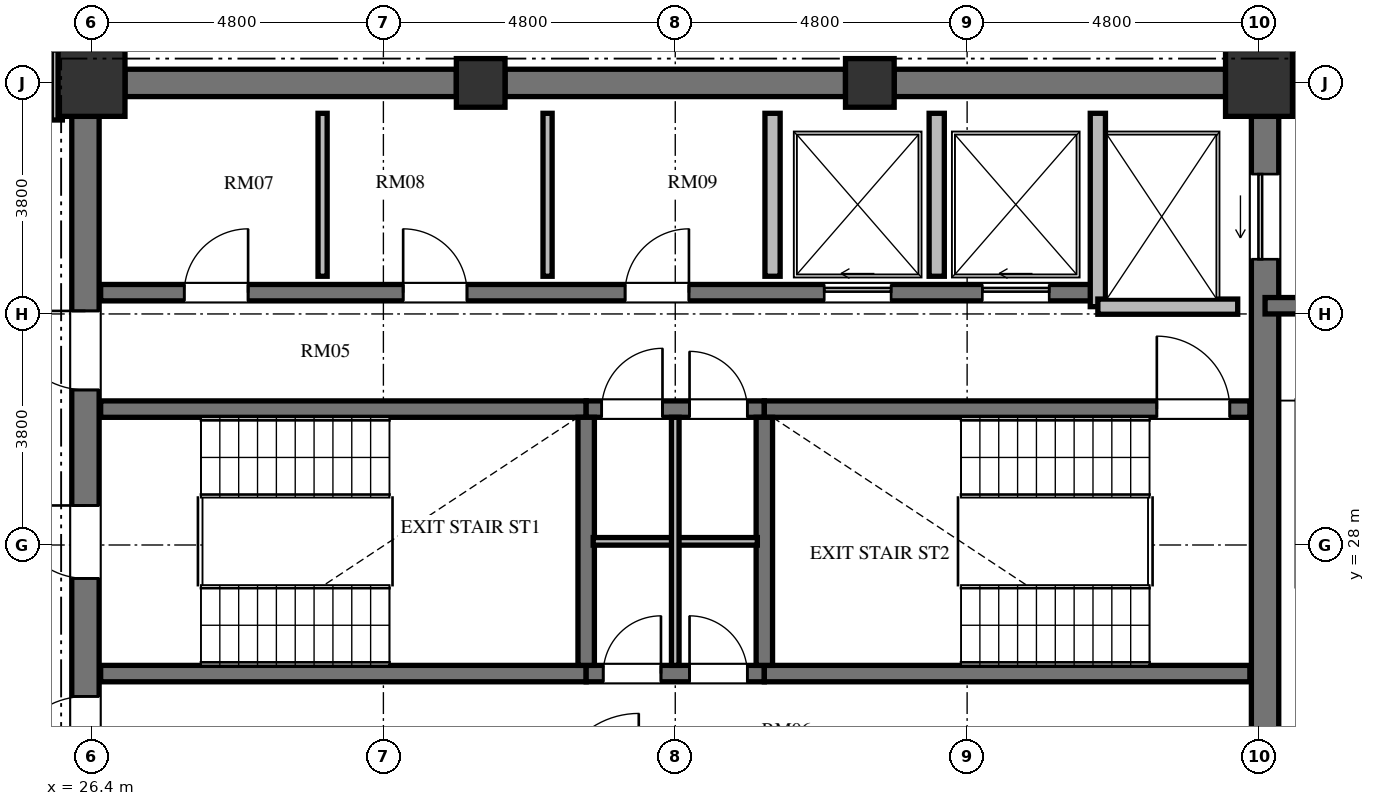
"""IFC4 building model, lengths in metres.
Left out: names, types, materials, properties, quantities, classifications, styles, units other than length and angle.
Written with IfcOpenShell. Run it as: python <this file> out.ifc"""

import sys

from ifc_helpers import new_model, si_unit, direction, frame, frame_2d, origin, origin_2d, place, context, subcontext, project, spatial, rectangle, extrude, element, fill, save


model = new_model("IFC4")
c1 = context("Model", 3, precision=1e-05, world=origin(), true_north=direction((0.0, 1.0)))
c2 = subcontext(c1, "Body", "Model", "MODEL_VIEW")
j1 = project(units=[si_unit("LENGTHUNIT", "METRE"), si_unit("PLANEANGLEUNIT", "RADIAN")], contexts=[c1])
p1 = place(None, origin())
s1 = spatial("IfcSite", under=j1, at=p1, CompositionType="ELEMENT")
p2 = place(p1, origin())
s2 = spatial("IfcBuilding", under=s1, at=p2, CompositionType="ELEMENT")
p3 = place(p2, frame((0.0, 0.0, 262.32)))
s3 = spatial("IfcBuildingStorey", under=s2, at=p3, CompositionType="ELEMENT", Elevation=262.32)
p4 = place(p3, frame((45.6, 35.6, 0.0), z_axis=(0.0, 0.0, 1.0), x_axis=(1.0, 0.0, 0.0)))
e1 = element("IfcColumn", 1, at=p4, inside=s3, PredefinedType="COLUMN", context=c2, shape_type="SweptSolid", body=[
    extrude(rectangle(XDim=1.1, YDim=1.1, at=origin_2d()), origin(), (0.0, 0.0, 1.0), 3.648),
])
for number, where, z_axis, x_axis in (
    (2, (39.2, 35.6, 0.0), (0.0, 0.0, 1.0), (1.0, 0.0, 0.0)),
    (3, (32.8, 35.6, 0.0), (0.0, 0.0, 1.0), (1.0, 0.0, 0.0)),
):
    element("IfcColumn", number, at=place(p3, frame(where, z_axis=z_axis, x_axis=x_axis)), inside=s3, PredefinedType="COLUMN", context=c2, shape_type="SweptSolid", body=[
        extrude(rectangle(XDim=0.8, YDim=0.8, at=origin_2d()), origin(), (0.0, 0.0, 1.0), 3.648),
    ])
p5 = place(p3, frame((26.4, 35.6, 0.0), z_axis=(0.0, 0.0, 1.0), x_axis=(1.0, 0.0, 0.0)))
e4 = element("IfcColumn", 4, at=p5, inside=s3, PredefinedType="COLUMN", context=c2, shape_type="SweptSolid", body=[
    extrude(rectangle(XDim=1.1, YDim=1.1, at=origin_2d()), origin(), (0.0, 0.0, 1.0), 3.648),
])
p6 = place(p3, frame((26.3, 20.95, 0.0), z_axis=(0.0, 0.0, 1.0), x_axis=(0.0, 1.0, 0.0)))
e5 = element("IfcWall", 5, at=p6, inside=s3, PredefinedType="SHEAR", context=c2, shape_type="SweptSolid", body=[
    extrude(rectangle(XDim=14.1, YDim=0.45, at=frame_2d((7.05, 0.0))), origin(), (0.0, 0.0, 1.0), 3.648),
])
p7 = place(p6, frame((6.5, 0.0, 0.0)))
e6 = element("IfcOpeningElement", 6, at=p7, cuts=e5, PredefinedType="OPENING", context=c2, shape_type="SweptSolid", body=[
    extrude(rectangle(XDim=1.2, YDim=2.15, at=frame_2d((0.6, 1.075))), frame((0.0, 0.235, 0.0), z_axis=(0.0, -1.0, 0.0), x_axis=(1.0, 0.0, 0.0)), (0.0, 0.0, 1.0), 0.47),
])
p8 = place(p6, frame((9.6, 0.0, 0.0)))
e7 = element("IfcOpeningElement", 7, at=p8, cuts=e5, PredefinedType="OPENING", context=c2, shape_type="SweptSolid", body=[
    extrude(rectangle(XDim=1.3, YDim=2.2, at=frame_2d((0.65, 1.1))), frame((0.0, 0.235, 0.0), z_axis=(0.0, -1.0, 0.0), x_axis=(1.0, 0.0, 0.0)), (0.0, 0.0, 1.0), 0.47),
])
p9 = place(p6, frame((3.26, 0.0, 0.0)))
e8 = element("IfcOpeningElement", 8, at=p9, cuts=e5, PredefinedType="OPENING", context=c2, shape_type="SweptSolid", body=[
    extrude(rectangle(XDim=1.3, YDim=2.2, at=frame_2d((0.65, 1.1))), frame((0.0, 0.235, 0.0), z_axis=(0.0, -1.0, 0.0), x_axis=(1.0, 0.0, 0.0)), (0.0, 0.0, 1.0), 0.47),
])
p10 = place(p3, frame((45.7, 20.95, 0.0), z_axis=(0.0, 0.0, 1.0), x_axis=(0.0, 1.0, 0.0)))
e9 = element("IfcWall", 9, at=p10, inside=s3, PredefinedType="SHEAR", context=c2, shape_type="SweptSolid", body=[
    extrude(rectangle(XDim=14.1, YDim=0.45, at=frame_2d((7.05, 0.0))), origin(), (0.0, 0.0, 1.0), 3.648),
])
p11 = place(p10, frame((11.75, 0.0, 0.0)))
e10 = element("IfcOpeningElement", 10, at=p11, cuts=e9, PredefinedType="OPENING", context=c2, shape_type="SweptSolid", body=[
    extrude(rectangle(XDim=1.4, YDim=2.3, at=frame_2d((0.7, 1.15))), frame((0.0, 0.235, 0.0), z_axis=(0.0, -1.0, 0.0), x_axis=(1.0, 0.0, 0.0)), (0.0, 0.0, 1.0), 0.47),
])
p12 = place(p10, frame((0.95, 0.0, 0.0)))
e11 = element("IfcOpeningElement", 11, at=p12, cuts=e9, PredefinedType="OPENING", context=c2, shape_type="SweptSolid", body=[
    extrude(rectangle(XDim=1.4, YDim=2.3, at=frame_2d((0.7, 1.15))), frame((0.0, 0.235, 0.0), z_axis=(0.0, -1.0, 0.0), x_axis=(1.0, 0.0, 0.0)), (0.0, 0.0, 1.0), 0.47),
])
p13 = place(p3, frame((26.95, 35.6, 0.0), z_axis=(0.0, 0.0, 1.0), x_axis=(1.0, 0.0, 0.0)))
e12 = element("IfcWall", 12, at=p13, inside=s3, PredefinedType="SHEAR", context=c2, shape_type="SweptSolid", body=[
    extrude(rectangle(XDim=5.45, YDim=0.45, at=frame_2d((2.725, 0.0))), origin(), (0.0, 0.0, 1.0), 3.648),
])
p14 = place(p3, frame((33.2, 35.6, 0.0), z_axis=(0.0, 0.0, 1.0), x_axis=(1.0, 0.0, 0.0)))
e13 = element("IfcWall", 13, at=p14, inside=s3, PredefinedType="SHEAR", context=c2, shape_type="SweptSolid", body=[
    extrude(rectangle(XDim=5.6, YDim=0.45, at=frame_2d((2.8, 0.0))), origin(), (0.0, 0.0, 1.0), 3.648),
])
p15 = place(p3, frame((39.6, 35.6, 0.0), z_axis=(0.0, 0.0, 1.0), x_axis=(1.0, 0.0, 0.0)))
e14 = element("IfcWall", 14, at=p15, inside=s3, PredefinedType="SHEAR", context=c2, shape_type="SweptSolid", body=[
    extrude(rectangle(XDim=5.45, YDim=0.45, at=frame_2d((2.725, 0.0))), origin(), (0.0, 0.0, 1.0), 3.648),
])
p16 = place(p3, frame((26.55, 30.235, 0.0), z_axis=(0.0, 0.0, 1.0), x_axis=(1.0, 0.0, 0.0)))
e15 = element("IfcWall", 15, at=p16, inside=s3, PredefinedType="SHEAR", context=c2, shape_type="SweptSolid", body=[
    extrude(rectangle(XDim=7.985, YDim=0.27, at=frame_2d((3.992, 0.0))), origin(), (0.0, 0.0, 1.0), 3.648),
])
p17 = place(p3, frame((34.535, 30.235, 0.0), z_axis=(0.0, 0.0, 1.0), x_axis=(1.0, 0.0, 0.0)))
e16 = element("IfcWall", 16, at=p17, inside=s3, PredefinedType="SHEAR", context=c2, shape_type="SweptSolid", body=[
    extrude(rectangle(XDim=2.93, YDim=0.27, at=frame_2d((1.465, 0.0))), origin(), (0.0, 0.0, 1.0), 3.648),
])
p18 = place(p17, frame((0.255, 0.0, 0.0)))
e17 = element("IfcOpeningElement", 17, at=p18, cuts=e16, PredefinedType="OPENING", context=c2, shape_type="SweptSolid", body=[
    extrude(rectangle(XDim=1.0, YDim=2.1, at=frame_2d((0.5, 1.05))), frame((0.0, 0.145, 0.0), z_axis=(0.0, -1.0, 0.0), x_axis=(1.0, 0.0, 0.0)), (0.0, 0.0, 1.0), 0.29),
])
p19 = place(p17, frame((1.7, 0.0, 0.0)))
e18 = element("IfcOpeningElement", 18, at=p19, cuts=e16, PredefinedType="OPENING", context=c2, shape_type="SweptSolid", body=[
    extrude(rectangle(XDim=0.95, YDim=2.1, at=frame_2d((0.475, 1.05))), frame((0.0, 0.145, 0.0), z_axis=(0.0, -1.0, 0.0), x_axis=(1.0, 0.0, 0.0)), (0.0, 0.0, 1.0), 0.29),
])
p20 = place(p3, frame((37.465, 30.235, 0.0), z_axis=(0.0, 0.0, 1.0), x_axis=(1.0, 0.0, 0.0)))
e19 = element("IfcWall", 19, at=p20, inside=s3, PredefinedType="SHEAR", context=c2, shape_type="SweptSolid", body=[
    extrude(rectangle(XDim=7.985, YDim=0.27, at=frame_2d((3.992, 0.0))), origin(), (0.0, 0.0, 1.0), 3.648),
])
p21 = place(p20, frame((6.455, 0.0, 0.0)))
e20 = element("IfcOpeningElement", 20, at=p21, cuts=e19, PredefinedType="OPENING", context=c2, shape_type="SweptSolid", body=[
    extrude(rectangle(XDim=1.2, YDim=2.15, at=frame_2d((0.6, 1.075))), frame((0.0, 0.145, 0.0), z_axis=(0.0, -1.0, 0.0), x_axis=(1.0, 0.0, 0.0)), (0.0, 0.0, 1.0), 0.29),
])
p22 = place(p3, frame((26.55, 25.885, 0.0), z_axis=(0.0, 0.0, 1.0), x_axis=(1.0, 0.0, 0.0)))
e21 = element("IfcWall", 21, at=p22, inside=s3, PredefinedType="SHEAR", context=c2, shape_type="SweptSolid", body=[
    extrude(rectangle(XDim=7.985, YDim=0.27, at=frame_2d((3.992, 0.0))), origin(), (0.0, 0.0, 1.0), 3.648),
])
p23 = place(p3, frame((34.535, 25.885, 0.0), z_axis=(0.0, 0.0, 1.0), x_axis=(1.0, 0.0, 0.0)))
e22 = element("IfcWall", 22, at=p23, inside=s3, PredefinedType="SHEAR", context=c2, shape_type="SweptSolid", body=[
    extrude(rectangle(XDim=2.93, YDim=0.27, at=frame_2d((1.465, 0.0))), origin(), (0.0, 0.0, 1.0), 3.648),
])
p24 = place(p23, frame((0.28, 0.0, 0.0)))
e23 = element("IfcOpeningElement", 23, at=p24, cuts=e22, PredefinedType="OPENING", context=c2, shape_type="SweptSolid", body=[
    extrude(rectangle(XDim=0.95, YDim=2.1, at=frame_2d((0.475, 1.05))), frame((0.0, 0.145, 0.0), z_axis=(0.0, -1.0, 0.0), x_axis=(1.0, 0.0, 0.0)), (0.0, 0.0, 1.0), 0.29),
])
p25 = place(p23, frame((1.7, 0.0, 0.0)))
e24 = element("IfcOpeningElement", 24, at=p25, cuts=e22, PredefinedType="OPENING", context=c2, shape_type="SweptSolid", body=[
    extrude(rectangle(XDim=0.95, YDim=2.1, at=frame_2d((0.475, 1.05))), frame((0.0, 0.145, 0.0), z_axis=(0.0, -1.0, 0.0), x_axis=(1.0, 0.0, 0.0)), (0.0, 0.0, 1.0), 0.29),
])
p26 = place(p3, frame((37.465, 25.885, 0.0), z_axis=(0.0, 0.0, 1.0), x_axis=(1.0, 0.0, 0.0)))
e25 = element("IfcWall", 25, at=p26, inside=s3, PredefinedType="SHEAR", context=c2, shape_type="SweptSolid", body=[
    extrude(rectangle(XDim=7.985, YDim=0.27, at=frame_2d((3.992, 0.0))), origin(), (0.0, 0.0, 1.0), 3.648),
])
for number, where, z_axis, x_axis in (
    (26, (34.535, 26.02, 0.0), (0.0, 0.0, 1.0), (0.0, 1.0, 0.0)),
    (27, (37.465, 26.02, 0.0), (0.0, 0.0, 1.0), (0.0, 1.0, 0.0)),
):
    element("IfcWall", number, at=place(p3, frame(where, z_axis=z_axis, x_axis=x_axis)), inside=s3, PredefinedType="SHEAR", context=c2, shape_type="SweptSolid", body=[
        extrude(rectangle(XDim=4.08, YDim=0.27, at=frame_2d((2.04, 0.0))), origin(), (0.0, 0.0, 1.0), 3.648),
    ])
p27 = place(p3, frame((34.65, 28.06, 0.0), z_axis=(0.0, 0.0, 1.0), x_axis=(1.0, 0.0, 0.0)))
e28 = element("IfcWall", 28, at=p27, inside=s3, PredefinedType="PARTITIONING", context=c2, shape_type="SweptSolid", body=[
    extrude(rectangle(XDim=2.7, YDim=0.125, at=frame_2d((1.35, 0.0))), origin(), (0.0, 0.0, 1.0), 3.448),
])
p28 = place(p3, frame((36.0, 26.02, 0.0), z_axis=(0.0, 0.0, 1.0), x_axis=(0.0, 1.0, 0.0)))
e29 = element("IfcWall", 29, at=p28, inside=s3, PredefinedType="PARTITIONING", context=c2, shape_type="SweptSolid", body=[
    extrude(rectangle(XDim=4.08, YDim=0.125, at=frame_2d((2.04, 0.0))), origin(), (0.0, 0.0, 1.0), 3.448),
])
p29 = place(p3, frame((26.55, 32.15, 0.0), z_axis=(0.0, 0.0, 1.0), x_axis=(1.0, 0.0, 0.0)))
e30 = element("IfcWall", 30, at=p29, inside=s3, PredefinedType="SHEAR", context=c2, shape_type="SweptSolid", body=[
    extrude(rectangle(XDim=16.4, YDim=0.27, at=frame_2d((8.2, 0.0))), origin(), (0.0, 0.0, 1.0), 3.648),
])
p30 = place(p29, frame((1.375, 0.0, 0.0)))
e31 = element("IfcOpeningElement", 31, at=p30, cuts=e30, PredefinedType="OPENING", context=c2, shape_type="SweptSolid", body=[
    extrude(rectangle(XDim=1.05, YDim=2.15, at=frame_2d((0.525, 1.075))), frame((0.0, 0.145, 0.0), z_axis=(0.0, -1.0, 0.0), x_axis=(1.0, 0.0, 0.0)), (0.0, 0.0, 1.0), 0.29),
])
p31 = place(p29, frame((4.975, 0.0, 0.0)))
e32 = element("IfcOpeningElement", 32, at=p31, cuts=e30, PredefinedType="OPENING", context=c2, shape_type="SweptSolid", body=[
    extrude(rectangle(XDim=1.05, YDim=2.15, at=frame_2d((0.525, 1.075))), frame((0.0, 0.145, 0.0), z_axis=(0.0, -1.0, 0.0), x_axis=(1.0, 0.0, 0.0)), (0.0, 0.0, 1.0), 0.29),
])
p32 = place(p29, frame((8.625, 0.0, 0.0)))
e33 = element("IfcOpeningElement", 33, at=p32, cuts=e30, PredefinedType="OPENING", context=c2, shape_type="SweptSolid", body=[
    extrude(rectangle(XDim=1.05, YDim=2.15, at=frame_2d((0.525, 1.075))), frame((0.0, 0.145, 0.0), z_axis=(0.0, -1.0, 0.0), x_axis=(1.0, 0.0, 0.0)), (0.0, 0.0, 1.0), 0.29),
])
p33 = place(p29, frame((11.9, 0.0, 0.0)))
e34 = element("IfcOpeningElement", 34, at=p33, cuts=e30, PredefinedType="OPENING", context=c2, shape_type="SweptSolid", body=[
    extrude(rectangle(XDim=1.1, YDim=2.2, at=frame_2d((0.55, 1.1))), frame((0.0, 0.145, 0.0), z_axis=(0.0, -1.0, 0.0), x_axis=(1.0, 0.0, 0.0)), (0.0, 0.0, 1.0), 0.29),
])
p34 = place(p29, frame((14.5, 0.0, 0.0)))
e35 = element("IfcOpeningElement", 35, at=p34, cuts=e30, PredefinedType="OPENING", context=c2, shape_type="SweptSolid", body=[
    extrude(rectangle(XDim=1.1, YDim=2.2, at=frame_2d((0.55, 1.1))), frame((0.0, 0.145, 0.0), z_axis=(0.0, -1.0, 0.0), x_axis=(1.0, 0.0, 0.0)), (0.0, 0.0, 1.0), 0.29),
])
p35 = place(p3, frame((42.95, 31.92, 0.0), z_axis=(0.0, 0.0, 1.0), x_axis=(0.0, 1.0, 0.0)))
e36 = element("IfcWall", 36, at=p35, inside=s3, PredefinedType="SOLIDWALL", context=c2, shape_type="SweptSolid", body=[
    extrude(rectangle(XDim=3.18, YDim=0.25, at=frame_2d((1.59, 0.0))), origin(), (0.0, 0.0, 1.0), 3.448),
])
p36 = place(p3, frame((42.95, 31.92, 0.0), z_axis=(0.0, 0.0, 1.0), x_axis=(1.0, 0.0, 0.0)))
e37 = element("IfcWall", 37, at=p36, inside=s3, PredefinedType="SOLIDWALL", context=c2, shape_type="SweptSolid", body=[
    extrude(rectangle(XDim=2.3, YDim=0.25, at=frame_2d((1.15, 0.0))), origin(), (0.0, 0.0, 1.0), 3.448),
])
for number, where, z_axis, x_axis in (
    (38, (37.6, 32.42, 0.0), (0.0, 0.0, 1.0), (0.0, 1.0, 0.0)),
    (39, (40.3, 32.42, 0.0), (0.0, 0.0, 1.0), (0.0, 1.0, 0.0)),
):
    element("IfcWall", number, at=place(p3, frame(where, z_axis=z_axis, x_axis=x_axis)), inside=s3, PredefinedType="SOLIDWALL", context=c2, shape_type="SweptSolid", body=[
        extrude(rectangle(XDim=2.68, YDim=0.25, at=frame_2d((1.34, 0.0))), origin(), (0.0, 0.0, 1.0), 3.448),
    ])
for number, where, z_axis, x_axis in (
    (40, (30.2, 32.42, 0.0), (0.0, 0.0, 1.0), (0.0, 1.0, 0.0)),
    (41, (33.9, 32.42, 0.0), (0.0, 0.0, 1.0), (0.0, 1.0, 0.0)),
):
    element("IfcWall", number, at=place(p3, frame(where, z_axis=z_axis, x_axis=x_axis)), inside=s3, PredefinedType="PARTITIONING", context=c2, shape_type="SweptSolid", body=[
        extrude(rectangle(XDim=2.68, YDim=0.15, at=frame_2d((1.34, 0.0))), origin(), (0.0, 0.0, 1.0), 3.448),
    ])
p37 = place(p3, frame((45.925, 35.98, 0.0), z_axis=(0.0, 0.0, 1.0), x_axis=(1.0, 0.0, 0.0)))
e42 = element("IfcWall", 42, at=p37, inside=s3, PredefinedType="SHEAR", context=c2, shape_type="SweptSolid", body=[
    extrude(rectangle(XDim=4.625, YDim=0.27, at=frame_2d((2.312, 0.0))), origin(), (0.0, 0.0, 1.0), 3.648),
])
p38 = place(p3, frame((45.7, 31.935, 0.0), z_axis=(0.0, 0.0, 1.0), x_axis=(1.0, 0.0, 0.0)))
e43 = element("IfcWall", 43, at=p38, inside=s3, PredefinedType="SHEAR", context=c2, shape_type="SweptSolid", body=[
    extrude(rectangle(XDim=4.715, YDim=0.27, at=frame_2d((2.357, 0.0))), origin(), (0.0, 0.0, 1.0), 3.648),
])
p39 = place(p3, frame((25.83, 36.14, 0.0), z_axis=(0.0, 0.0, 1.0), x_axis=(0.0, -1.0, 0.0)))
e44 = element("IfcWall", 44, at=p39, inside=s3, PredefinedType="PARTITIONING", context=c2, shape_type="SweptSolid", body=[
    extrude(rectangle(XDim=1.15, YDim=0.18, at=frame_2d((0.575, 0.0))), origin(), (0.0, 0.0, 1.0), 3.448),
])
p40 = place(p7, origin())
e45 = element("IfcDoor", 45, at=p40, inside=s3, OperationType="SINGLE_SWING_RIGHT", PredefinedType="DOOR", context=c2, shape_type="SweptSolid", body=[
    extrude(rectangle(XDim=1.2, YDim=2.15, at=frame_2d((0.6, 1.075))), frame((0.0, 0.025, 0.0), z_axis=(0.0, -1.0, 0.0), x_axis=(1.0, 0.0, 0.0)), (0.0, 0.0, 1.0), 0.05),
])
fill(e6, e45)
p41 = place(p21, origin())
e46 = element("IfcDoor", 46, at=p41, inside=s3, OperationType="SINGLE_SWING_LEFT", PredefinedType="DOOR", context=c2, shape_type="SweptSolid", body=[
    extrude(rectangle(XDim=1.2, YDim=2.15, at=frame_2d((0.6, 1.075))), frame((0.0, 0.025, 0.0), z_axis=(0.0, -1.0, 0.0), x_axis=(1.0, 0.0, 0.0)), (0.0, 0.0, 1.0), 0.05),
])
fill(e20, e46)
p42 = place(p24, origin())
e47 = element("IfcDoor", 47, at=p42, inside=s3, OperationType="SINGLE_SWING_RIGHT", PredefinedType="DOOR", context=c2, shape_type="SweptSolid", body=[
    extrude(rectangle(XDim=0.95, YDim=2.1, at=frame_2d((0.475, 1.05))), frame((0.0, 0.025, 0.0), z_axis=(0.0, -1.0, 0.0), x_axis=(1.0, 0.0, 0.0)), (0.0, 0.0, 1.0), 0.05),
])
fill(e23, e47)
p43 = place(p25, origin())
e48 = element("IfcDoor", 48, at=p43, inside=s3, OperationType="SINGLE_SWING_LEFT", PredefinedType="DOOR", context=c2, shape_type="SweptSolid", body=[
    extrude(rectangle(XDim=0.95, YDim=2.1, at=frame_2d((0.475, 1.05))), frame((0.0, 0.025, 0.0), z_axis=(0.0, -1.0, 0.0), x_axis=(1.0, 0.0, 0.0)), (0.0, 0.0, 1.0), 0.05),
])
fill(e24, e48)
p44 = place(p18, origin())
e49 = element("IfcDoor", 49, at=p44, inside=s3, OperationType="SINGLE_SWING_RIGHT", PredefinedType="DOOR", context=c2, shape_type="SweptSolid", body=[
    extrude(rectangle(XDim=1.0, YDim=2.1, at=frame_2d((0.5, 1.05))), frame((0.0, 0.025, 0.0), z_axis=(0.0, -1.0, 0.0), x_axis=(1.0, 0.0, 0.0)), (0.0, 0.0, 1.0), 0.05),
])
fill(e17, e49)
p45 = place(p19, origin())
e50 = element("IfcDoor", 50, at=p45, inside=s3, OperationType="SINGLE_SWING_LEFT", PredefinedType="DOOR", context=c2, shape_type="SweptSolid", body=[
    extrude(rectangle(XDim=0.95, YDim=2.1, at=frame_2d((0.475, 1.05))), frame((0.0, 0.025, 0.0), z_axis=(0.0, -1.0, 0.0), x_axis=(1.0, 0.0, 0.0)), (0.0, 0.0, 1.0), 0.05),
])
fill(e18, e50)
p46 = place(p8, origin())
e51 = element("IfcDoor", 51, at=p46, inside=s3, OperationType="SINGLE_SWING_RIGHT", PredefinedType="DOOR", context=c2, shape_type="SweptSolid", body=[
    extrude(rectangle(XDim=1.3, YDim=2.2, at=frame_2d((0.65, 1.1))), frame((0.0, 0.025, 0.0), z_axis=(0.0, -1.0, 0.0), x_axis=(1.0, 0.0, 0.0)), (0.0, 0.0, 1.0), 0.05),
])
fill(e7, e51)
p47 = place(p9, origin())
e52 = element("IfcDoor", 52, at=p47, inside=s3, OperationType="SINGLE_SWING_LEFT", PredefinedType="DOOR", context=c2, shape_type="SweptSolid", body=[
    extrude(rectangle(XDim=1.3, YDim=2.2, at=frame_2d((0.65, 1.1))), frame((0.0, 0.025, 0.0), z_axis=(0.0, -1.0, 0.0), x_axis=(1.0, 0.0, 0.0)), (0.0, 0.0, 1.0), 0.05),
])
fill(e8, e52)
p48 = place(p30, origin())
e53 = element("IfcDoor", 53, at=p48, inside=s3, OperationType="SINGLE_SWING_RIGHT", PredefinedType="DOOR", context=c2, shape_type="SweptSolid", body=[
    extrude(rectangle(XDim=1.05, YDim=2.15, at=frame_2d((0.525, 1.075))), frame((0.0, 0.025, 0.0), z_axis=(0.0, -1.0, 0.0), x_axis=(1.0, 0.0, 0.0)), (0.0, 0.0, 1.0), 0.05),
])
fill(e31, e53)
p49 = place(p31, origin())
e54 = element("IfcDoor", 54, at=p49, inside=s3, OperationType="SINGLE_SWING_LEFT", PredefinedType="DOOR", context=c2, shape_type="SweptSolid", body=[
    extrude(rectangle(XDim=1.05, YDim=2.15, at=frame_2d((0.525, 1.075))), frame((0.0, 0.025, 0.0), z_axis=(0.0, -1.0, 0.0), x_axis=(1.0, 0.0, 0.0)), (0.0, 0.0, 1.0), 0.05),
])
fill(e32, e54)
p50 = place(p32, origin())
e55 = element("IfcDoor", 55, at=p50, inside=s3, OperationType="SINGLE_SWING_RIGHT", PredefinedType="DOOR", context=c2, shape_type="SweptSolid", body=[
    extrude(rectangle(XDim=1.05, YDim=2.15, at=frame_2d((0.525, 1.075))), frame((0.0, 0.025, 0.0), z_axis=(0.0, -1.0, 0.0), x_axis=(1.0, 0.0, 0.0)), (0.0, 0.0, 1.0), 0.05),
])
fill(e33, e55)
p51 = place(p33, origin())
e56 = element("IfcDoor", 56, at=p51, inside=s3, OperationType="SLIDING_TO_LEFT", PredefinedType="DOOR", context=c2, shape_type="SweptSolid", body=[
    extrude(rectangle(XDim=1.1, YDim=2.2, at=frame_2d((0.55, 1.1))), frame((0.0, 0.025, 0.0), z_axis=(0.0, -1.0, 0.0), x_axis=(1.0, 0.0, 0.0)), (0.0, 0.0, 1.0), 0.05),
])
fill(e34, e56)
p52 = place(p34, origin())
e57 = element("IfcDoor", 57, at=p52, inside=s3, OperationType="SLIDING_TO_LEFT", PredefinedType="DOOR", context=c2, shape_type="SweptSolid", body=[
    extrude(rectangle(XDim=1.1, YDim=2.2, at=frame_2d((0.55, 1.1))), frame((0.0, 0.025, 0.0), z_axis=(0.0, -1.0, 0.0), x_axis=(1.0, 0.0, 0.0)), (0.0, 0.0, 1.0), 0.05),
])
fill(e35, e57)
p53 = place(p11, origin())
e58 = element("IfcDoor", 58, at=p53, inside=s3, OperationType="SLIDING_TO_LEFT", PredefinedType="DOOR", context=c2, shape_type="SweptSolid", body=[
    extrude(rectangle(XDim=1.4, YDim=2.3, at=frame_2d((0.7, 1.15))), frame((0.0, 0.025, 0.0), z_axis=(0.0, -1.0, 0.0), x_axis=(1.0, 0.0, 0.0)), (0.0, 0.0, 1.0), 0.05),
])
fill(e10, e58)
save(model, sys.argv[1])
